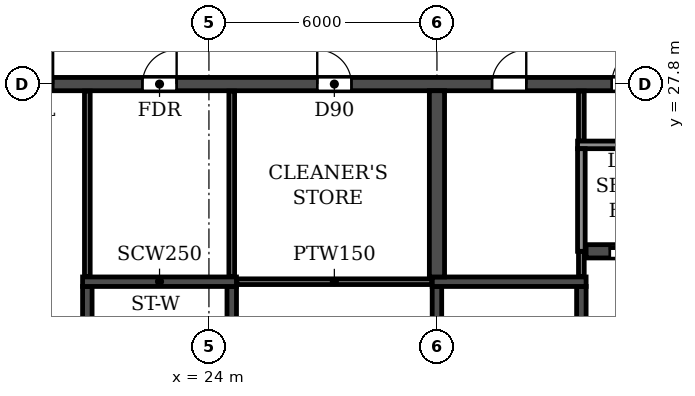
"""IFC4 building model, lengths in metres.
Left out: names, types, materials, properties, quantities, classifications, styles, units other than length and angle.
Written with IfcOpenShell. Run it as: python <this file> out.ifc"""

import sys

from ifc_helpers import new_model, si_unit, direction, frame, frame_2d, origin, place, context, subcontext, project, spatial, rectangle, extrude, element, fill, save


model = new_model("IFC4")
c1 = context("Model", 3, precision=1e-05, world=origin(), true_north=direction((0.0, 1.0)))
c2 = subcontext(c1, "Body", "Model", "MODEL_VIEW")
j1 = project(units=[si_unit("LENGTHUNIT", "METRE"), si_unit("PLANEANGLEUNIT", "RADIAN")], contexts=[c1])
p1 = place(None, origin())
s1 = spatial("IfcSite", under=j1, at=p1, CompositionType="ELEMENT")
p2 = place(p1, origin())
s2 = spatial("IfcBuilding", under=s1, at=p2, CompositionType="ELEMENT")
p3 = place(p2, frame((0.0, 0.0, 261.0)))
s3 = spatial("IfcBuildingStorey", under=s2, at=p3, CompositionType="ELEMENT", Elevation=261.0)
p4 = place(p3, frame((18.2, 27.8, 0.0), z_axis=(0.0, 0.0, 1.0), x_axis=(1.0, 0.0, 0.0)))
e1 = element("IfcWall", 1, at=p4, inside=s3, PredefinedType="SOLIDWALL", context=c2, shape_type="SweptSolid", body=[
    extrude(rectangle(XDim=65.6, YDim=0.35, at=frame_2d((32.8, 0.0))), origin(), (0.0, 0.0, 1.0), 5.7),
])
p5 = place(p4, frame((0.7, 0.0, 0.0)))
e2 = element("IfcOpeningElement", 2, at=p5, cuts=e1, PredefinedType="OPENING", context=c2, shape_type="SweptSolid", body=[
    extrude(rectangle(XDim=1.0, YDim=2.1, at=frame_2d((0.5, 1.05))), frame((0.0, 0.185, 0.0), z_axis=(0.0, -1.0, 0.0), x_axis=(1.0, 0.0, 0.0)), (0.0, 0.0, 1.0), 0.37),
])
p6 = place(p4, frame((4.05, 0.0, 0.0)))
e3 = element("IfcOpeningElement", 3, at=p6, cuts=e1, PredefinedType="OPENING", context=c2, shape_type="SweptSolid", body=[
    extrude(rectangle(XDim=0.9, YDim=2.1, at=frame_2d((0.45, 1.05))), frame((0.0, 0.185, 0.0), z_axis=(0.0, -1.0, 0.0), x_axis=(1.0, 0.0, 0.0)), (0.0, 0.0, 1.0), 0.37),
])
p7 = place(p4, frame((8.65, 0.0, 0.0)))
e4 = element("IfcOpeningElement", 4, at=p7, cuts=e1, PredefinedType="OPENING", context=c2, shape_type="SweptSolid", body=[
    extrude(rectangle(XDim=0.9, YDim=2.1, at=frame_2d((0.45, 1.05))), frame((0.0, 0.185, 0.0), z_axis=(0.0, -1.0, 0.0), x_axis=(1.0, 0.0, 0.0)), (0.0, 0.0, 1.0), 0.37),
])
p8 = place(p4, frame((13.25, 0.0, 0.0)))
e5 = element("IfcOpeningElement", 5, at=p8, cuts=e1, PredefinedType="OPENING", context=c2, shape_type="SweptSolid", body=[
    extrude(rectangle(XDim=0.9, YDim=2.1, at=frame_2d((0.45, 1.05))), frame((0.0, 0.185, 0.0), z_axis=(0.0, -1.0, 0.0), x_axis=(1.0, 0.0, 0.0)), (0.0, 0.0, 1.0), 0.37),
])
p9 = place(p4, frame((16.4, 0.0, 0.0)))
e6 = element("IfcOpeningElement", 6, at=p9, cuts=e1, PredefinedType="OPENING", context=c2, shape_type="SweptSolid", body=[
    extrude(rectangle(XDim=1.0, YDim=2.1, at=frame_2d((0.5, 1.05))), frame((0.0, 0.185, 0.0), z_axis=(0.0, -1.0, 0.0), x_axis=(1.0, 0.0, 0.0)), (0.0, 0.0, 1.0), 0.37),
])
p10 = place(p4, frame((21.6, 0.0, 0.0)))
e7 = element("IfcOpeningElement", 7, at=p10, cuts=e1, PredefinedType="OPENING", context=c2, shape_type="SweptSolid", body=[
    extrude(rectangle(XDim=1.0, YDim=2.1, at=frame_2d((0.5, 1.05))), frame((0.0, 0.185, 0.0), z_axis=(0.0, -1.0, 0.0), x_axis=(1.0, 0.0, 0.0)), (0.0, 0.0, 1.0), 0.37),
])
p11 = place(p4, frame((29.4, 0.0, 0.0)))
e8 = element("IfcOpeningElement", 8, at=p11, cuts=e1, PredefinedType="OPENING", context=c2, shape_type="SweptSolid", body=[
    extrude(rectangle(XDim=1.0, YDim=2.1, at=frame_2d((0.5, 1.05))), frame((0.0, 0.185, 0.0), z_axis=(0.0, -1.0, 0.0), x_axis=(1.0, 0.0, 0.0)), (0.0, 0.0, 1.0), 0.37),
])
p12 = place(p4, frame((32.3, 0.0, 0.0)))
e9 = element("IfcOpeningElement", 9, at=p12, cuts=e1, PredefinedType="OPENING", context=c2, shape_type="SweptSolid", body=[
    extrude(rectangle(XDim=1.0, YDim=2.1, at=frame_2d((0.5, 1.05))), frame((0.0, 0.185, 0.0), z_axis=(0.0, -1.0, 0.0), x_axis=(1.0, 0.0, 0.0)), (0.0, 0.0, 1.0), 0.37),
])
p13 = place(p4, frame((35.2, 0.0, 0.0)))
e10 = element("IfcOpeningElement", 10, at=p13, cuts=e1, PredefinedType="OPENING", context=c2, shape_type="SweptSolid", body=[
    extrude(rectangle(XDim=1.0, YDim=2.1, at=frame_2d((0.5, 1.05))), frame((0.0, 0.185, 0.0), z_axis=(0.0, -1.0, 0.0), x_axis=(1.0, 0.0, 0.0)), (0.0, 0.0, 1.0), 0.37),
])
p14 = place(p4, frame((37.8, 0.0, 0.0)))
e11 = element("IfcOpeningElement", 11, at=p14, cuts=e1, PredefinedType="OPENING", context=c2, shape_type="SweptSolid", body=[
    extrude(rectangle(XDim=1.0, YDim=2.1, at=frame_2d((0.5, 1.05))), frame((0.0, 0.185, 0.0), z_axis=(0.0, -1.0, 0.0), x_axis=(1.0, 0.0, 0.0)), (0.0, 0.0, 1.0), 0.37),
])
p15 = place(p4, frame((41.7, 0.0, 0.0)))
e12 = element("IfcOpeningElement", 12, at=p15, cuts=e1, PredefinedType="OPENING", context=c2, shape_type="SweptSolid", body=[
    extrude(rectangle(XDim=1.0, YDim=2.1, at=frame_2d((0.5, 1.05))), frame((0.0, 0.185, 0.0), z_axis=(0.0, -1.0, 0.0), x_axis=(1.0, 0.0, 0.0)), (0.0, 0.0, 1.0), 0.37),
])
p16 = place(p4, frame((45.6, 0.0, 0.0)))
e13 = element("IfcOpeningElement", 13, at=p16, cuts=e1, PredefinedType="OPENING", context=c2, shape_type="SweptSolid", body=[
    extrude(rectangle(XDim=1.0, YDim=2.1, at=frame_2d((0.5, 1.05))), frame((0.0, 0.185, 0.0), z_axis=(0.0, -1.0, 0.0), x_axis=(1.0, 0.0, 0.0)), (0.0, 0.0, 1.0), 0.37),
])
p17 = place(p4, frame((48.2, 0.0, 0.0)))
e14 = element("IfcOpeningElement", 14, at=p17, cuts=e1, PredefinedType="OPENING", context=c2, shape_type="SweptSolid", body=[
    extrude(rectangle(XDim=1.0, YDim=2.1, at=frame_2d((0.5, 1.05))), frame((0.0, 0.185, 0.0), z_axis=(0.0, -1.0, 0.0), x_axis=(1.0, 0.0, 0.0)), (0.0, 0.0, 1.0), 0.37),
])
p18 = place(p4, frame((51.45, 0.0, 0.0)))
e15 = element("IfcOpeningElement", 15, at=p18, cuts=e1, PredefinedType="OPENING", context=c2, shape_type="SweptSolid", body=[
    extrude(rectangle(XDim=0.9, YDim=2.1, at=frame_2d((0.45, 1.05))), frame((0.0, 0.185, 0.0), z_axis=(0.0, -1.0, 0.0), x_axis=(1.0, 0.0, 0.0)), (0.0, 0.0, 1.0), 0.37),
])
p19 = place(p4, frame((56.05, 0.0, 0.0)))
e16 = element("IfcOpeningElement", 16, at=p19, cuts=e1, PredefinedType="OPENING", context=c2, shape_type="SweptSolid", body=[
    extrude(rectangle(XDim=0.9, YDim=2.1, at=frame_2d((0.45, 1.05))), frame((0.0, 0.185, 0.0), z_axis=(0.0, -1.0, 0.0), x_axis=(1.0, 0.0, 0.0)), (0.0, 0.0, 1.0), 0.37),
])
p20 = place(p4, frame((60.65, 0.0, 0.0)))
e17 = element("IfcOpeningElement", 17, at=p20, cuts=e1, PredefinedType="OPENING", context=c2, shape_type="SweptSolid", body=[
    extrude(rectangle(XDim=0.9, YDim=2.1, at=frame_2d((0.45, 1.05))), frame((0.0, 0.185, 0.0), z_axis=(0.0, -1.0, 0.0), x_axis=(1.0, 0.0, 0.0)), (0.0, 0.0, 1.0), 0.37),
])
p21 = place(p4, frame((63.9, 0.0, 0.0)))
e18 = element("IfcOpeningElement", 18, at=p21, cuts=e1, PredefinedType="OPENING", context=c2, shape_type="SweptSolid", body=[
    extrude(rectangle(XDim=1.0, YDim=2.1, at=frame_2d((0.5, 1.05))), frame((0.0, 0.185, 0.0), z_axis=(0.0, -1.0, 0.0), x_axis=(1.0, 0.0, 0.0)), (0.0, 0.0, 1.0), 0.37),
])
p22 = place(p3, frame((33.925, 23.4, 0.0), z_axis=(0.0, 0.0, 1.0), x_axis=(1.0, 0.0, 0.0)))
e19 = element("IfcWall", 19, at=p22, inside=s3, PredefinedType="SOLIDWALL", context=c2, shape_type="SweptSolid", body=[
    extrude(rectangle(XDim=34.15, YDim=0.35, at=frame_2d((17.075, 0.0))), origin(), (0.0, 0.0, 1.0), 5.7),
])
p23 = place(p22, frame((16.175, 0.0, 0.0)))
e20 = element("IfcOpeningElement", 20, at=p23, cuts=e19, PredefinedType="OPENING", context=c2, shape_type="SweptSolid", body=[
    extrude(rectangle(XDim=1.8, YDim=2.1, at=frame_2d((0.9, 1.05))), frame((0.0, 0.185, 0.0), z_axis=(0.0, -1.0, 0.0), x_axis=(1.0, 0.0, 0.0)), (0.0, 0.0, 1.0), 0.37),
])
p24 = place(p22, frame((0.625, 0.0, 0.0)))
e21 = element("IfcOpeningElement", 21, at=p24, cuts=e19, PredefinedType="OPENING", context=c2, shape_type="SweptSolid", body=[
    extrude(rectangle(XDim=1.1, YDim=2.1, at=frame_2d((0.55, 1.05))), frame((0.0, 0.185, 0.0), z_axis=(0.0, -1.0, 0.0), x_axis=(1.0, 0.0, 0.0)), (0.0, 0.0, 1.0), 0.37),
])
p25 = place(p22, frame((3.225, 0.0, 0.0)))
e22 = element("IfcOpeningElement", 22, at=p25, cuts=e19, PredefinedType="OPENING", context=c2, shape_type="SweptSolid", body=[
    extrude(rectangle(XDim=1.1, YDim=2.1, at=frame_2d((0.55, 1.05))), frame((0.0, 0.185, 0.0), z_axis=(0.0, -1.0, 0.0), x_axis=(1.0, 0.0, 0.0)), (0.0, 0.0, 1.0), 0.37),
])
p26 = place(p22, frame((5.825, 0.0, 0.0)))
e23 = element("IfcOpeningElement", 23, at=p26, cuts=e19, PredefinedType="OPENING", context=c2, shape_type="SweptSolid", body=[
    extrude(rectangle(XDim=1.1, YDim=2.1, at=frame_2d((0.55, 1.05))), frame((0.0, 0.185, 0.0), z_axis=(0.0, -1.0, 0.0), x_axis=(1.0, 0.0, 0.0)), (0.0, 0.0, 1.0), 0.37),
])
p27 = place(p22, frame((8.425, 0.0, 0.0)))
e24 = element("IfcOpeningElement", 24, at=p27, cuts=e19, PredefinedType="OPENING", context=c2, shape_type="SweptSolid", body=[
    extrude(rectangle(XDim=1.1, YDim=2.1, at=frame_2d((0.55, 1.05))), frame((0.0, 0.185, 0.0), z_axis=(0.0, -1.0, 0.0), x_axis=(1.0, 0.0, 0.0)), (0.0, 0.0, 1.0), 0.37),
])
p28 = place(p22, frame((11.025, 0.0, 0.0)))
e25 = element("IfcOpeningElement", 25, at=p28, cuts=e19, PredefinedType="OPENING", context=c2, shape_type="SweptSolid", body=[
    extrude(rectangle(XDim=1.1, YDim=2.1, at=frame_2d((0.55, 1.05))), frame((0.0, 0.185, 0.0), z_axis=(0.0, -1.0, 0.0), x_axis=(1.0, 0.0, 0.0)), (0.0, 0.0, 1.0), 0.37),
])
p29 = place(p22, frame((13.625, 0.0, 0.0)))
e26 = element("IfcOpeningElement", 26, at=p29, cuts=e19, PredefinedType="OPENING", context=c2, shape_type="SweptSolid", body=[
    extrude(rectangle(XDim=1.1, YDim=2.1, at=frame_2d((0.55, 1.05))), frame((0.0, 0.185, 0.0), z_axis=(0.0, -1.0, 0.0), x_axis=(1.0, 0.0, 0.0)), (0.0, 0.0, 1.0), 0.37),
])
p30 = place(p22, frame((24.625, 0.0, 0.0)))
e27 = element("IfcOpeningElement", 27, at=p30, cuts=e19, PredefinedType="OPENING", context=c2, shape_type="SweptSolid", body=[
    extrude(rectangle(XDim=1.1, YDim=2.1, at=frame_2d((0.55, 1.05))), frame((0.0, 0.185, 0.0), z_axis=(0.0, -1.0, 0.0), x_axis=(1.0, 0.0, 0.0)), (0.0, 0.0, 1.0), 0.37),
])
p31 = place(p22, frame((27.225, 0.0, 0.0)))
e28 = element("IfcOpeningElement", 28, at=p31, cuts=e19, PredefinedType="OPENING", context=c2, shape_type="SweptSolid", body=[
    extrude(rectangle(XDim=1.1, YDim=2.1, at=frame_2d((0.55, 1.05))), frame((0.0, 0.185, 0.0), z_axis=(0.0, -1.0, 0.0), x_axis=(1.0, 0.0, 0.0)), (0.0, 0.0, 1.0), 0.37),
])
p32 = place(p3, frame((30.0, 22.725, 0.0), z_axis=(0.0, 0.0, 1.0), x_axis=(0.0, 1.0, 0.0)))
e29 = element("IfcWall", 29, at=p32, inside=s3, PredefinedType="SOLIDWALL", context=c2, shape_type="SweptSolid", body=[
    extrude(rectangle(XDim=4.9, YDim=0.4, at=frame_2d((2.45, 0.0))), origin(), (0.0, 0.0, 1.0), 5.7),
])
p33 = place(p3, frame((30.0, 14.775, 0.0), z_axis=(0.0, 0.0, 1.0), x_axis=(0.0, 1.0, 0.0)))
e30 = element("IfcWall", 30, at=p33, inside=s3, PredefinedType="SOLIDWALL", context=c2, shape_type="SweptSolid", body=[
    extrude(rectangle(XDim=7.7, YDim=0.25, at=frame_2d((3.85, 0.0))), origin(), (0.0, 0.0, 1.0), 5.7),
])
p34 = place(p3, frame((33.8, 14.775, 0.0), z_axis=(0.0, 0.0, 1.0), x_axis=(0.0, 1.0, 0.0)))
e31 = element("IfcWall", 31, at=p34, inside=s3, PredefinedType="SOLIDWALL", context=c2, shape_type="SweptSolid", body=[
    extrude(rectangle(XDim=7.7, YDim=0.25, at=frame_2d((3.85, 0.0))), origin(), (0.0, 0.0, 1.0), 5.7),
])
p35 = place(p34, frame((0.525, 0.0, 0.0)))
e32 = element("IfcOpeningElement", 32, at=p35, cuts=e31, PredefinedType="OPENING", context=c2, shape_type="SweptSolid", body=[
    extrude(rectangle(XDim=1.0, YDim=2.1, at=frame_2d((0.5, 1.05))), frame((0.0, 0.135, 0.0), z_axis=(0.0, -1.0, 0.0), x_axis=(1.0, 0.0, 0.0)), (0.0, 0.0, 1.0), 0.27),
])
p36 = place(p3, frame((29.875, 22.6, 0.0), z_axis=(0.0, 0.0, 1.0), x_axis=(1.0, 0.0, 0.0)))
e33 = element("IfcWall", 33, at=p36, inside=s3, PredefinedType="SOLIDWALL", context=c2, shape_type="SweptSolid", body=[
    extrude(rectangle(XDim=4.05, YDim=0.25, at=frame_2d((2.025, 0.0))), origin(), (0.0, 0.0, 1.0), 5.7),
])
p37 = place(p3, frame((20.8, 14.775, 0.0), z_axis=(0.0, 0.0, 1.0), x_axis=(0.0, 1.0, 0.0)))
e34 = element("IfcWall", 34, at=p37, inside=s3, PredefinedType="SOLIDWALL", context=c2, shape_type="SweptSolid", body=[
    extrude(rectangle(XDim=7.7, YDim=0.25, at=frame_2d((3.85, 0.0))), origin(), (0.0, 0.0, 1.0), 5.7),
])
p38 = place(p37, frame((0.525, 0.0, 0.0)))
e35 = element("IfcOpeningElement", 35, at=p38, cuts=e34, PredefinedType="OPENING", context=c2, shape_type="SweptSolid", body=[
    extrude(rectangle(XDim=1.0, YDim=2.1, at=frame_2d((0.5, 1.05))), frame((0.0, 0.135, 0.0), z_axis=(0.0, -1.0, 0.0), x_axis=(1.0, 0.0, 0.0)), (0.0, 0.0, 1.0), 0.27),
])
p39 = place(p3, frame((24.6, 14.775, 0.0), z_axis=(0.0, 0.0, 1.0), x_axis=(0.0, 1.0, 0.0)))
e36 = element("IfcWall", 36, at=p39, inside=s3, PredefinedType="SOLIDWALL", context=c2, shape_type="SweptSolid", body=[
    extrude(rectangle(XDim=7.7, YDim=0.25, at=frame_2d((3.85, 0.0))), origin(), (0.0, 0.0, 1.0), 5.7),
])
p40 = place(p3, frame((20.675, 22.6, 0.0), z_axis=(0.0, 0.0, 1.0), x_axis=(1.0, 0.0, 0.0)))
e37 = element("IfcWall", 37, at=p40, inside=s3, PredefinedType="SOLIDWALL", context=c2, shape_type="SweptSolid", body=[
    extrude(rectangle(XDim=4.05, YDim=0.25, at=frame_2d((2.025, 0.0))), origin(), (0.0, 0.0, 1.0), 5.7),
])
p41 = place(p3, frame((24.735, 22.6, 0.0), z_axis=(0.0, 0.0, 1.0), x_axis=(1.0, 0.0, 0.0)))
e38 = element("IfcWall", 38, at=p41, inside=s3, PredefinedType="PARTITIONING", context=c2, shape_type="SweptSolid", body=[
    extrude(rectangle(XDim=5.13, YDim=0.15, at=frame_2d((2.565, 0.0))), origin(), (0.0, 0.0, 1.0), 5.7),
])
for number, where, z_axis, x_axis in (
    (39, (20.8, 22.735, 0.0), (0.0, 0.0, 1.0), (0.0, 1.0, 0.0)),
    (40, (24.6, 22.735, 0.0), (0.0, 0.0, 1.0), (0.0, 1.0, 0.0)),
):
    element("IfcWall", number, at=place(p3, frame(where, z_axis=z_axis, x_axis=x_axis)), inside=s3, PredefinedType="PARTITIONING", context=c2, shape_type="SweptSolid", body=[
        extrude(rectangle(XDim=4.88, YDim=0.15, at=frame_2d((2.44, 0.0))), origin(), (0.0, 0.0, 1.0), 5.7),
    ])
p42 = place(p3, frame((33.8, 22.735, 0.0), z_axis=(0.0, 0.0, 1.0), x_axis=(0.0, 1.0, 0.0)))
e41 = element("IfcWall", 41, at=p42, inside=s3, PredefinedType="PARTITIONING", context=c2, shape_type="SweptSolid", body=[
    extrude(rectangle(XDim=0.665, YDim=0.15, at=frame_2d((0.333, 0.0))), origin(), (0.0, 0.0, 1.0), 5.7),
])
p43 = place(p3, frame((33.8, 26.3, 0.0), z_axis=(0.0, 0.0, 1.0), x_axis=(0.0, 1.0, 0.0)))
e42 = element("IfcWall", 42, at=p43, inside=s3, PredefinedType="PARTITIONING", context=c2, shape_type="SweptSolid", body=[
    extrude(rectangle(XDim=1.315, YDim=0.15, at=frame_2d((0.657, 0.0))), origin(), (0.0, 0.0, 1.0), 5.7),
])
p44 = place(p3, frame((33.7, 26.2, 0.0), z_axis=(0.0, 0.0, 1.0), x_axis=(1.0, 0.0, 0.0)))
e43 = element("IfcWall", 43, at=p44, inside=s3, PredefinedType="PARTITIONING", context=c2, shape_type="SweptSolid", body=[
    extrude(rectangle(XDim=10.4, YDim=0.2, at=frame_2d((5.2, 0.0))), origin(), (0.0, 0.0, 1.0), 5.7),
])
p45 = place(p3, frame((33.8, 23.4, 0.0), z_axis=(0.0, 0.0, 1.0), x_axis=(0.0, 1.0, 0.0)))
e44 = element("IfcWall", 44, at=p45, inside=s3, PredefinedType="PARTITIONING", context=c2, shape_type="SweptSolid", body=[
    extrude(rectangle(XDim=2.7, YDim=0.2, at=frame_2d((1.35, 0.0))), origin(), (0.0, 0.0, 1.0), 5.7),
])
p46 = place(p5, origin())
e45 = element("IfcDoor", 45, at=p46, inside=s3, OperationType="SINGLE_SWING_RIGHT", PredefinedType="DOOR", context=c2, shape_type="SweptSolid", body=[
    extrude(rectangle(XDim=1.0, YDim=2.1, at=frame_2d((0.5, 1.05))), frame((0.0, 0.025, 0.0), z_axis=(0.0, -1.0, 0.0), x_axis=(1.0, 0.0, 0.0)), (0.0, 0.0, 1.0), 0.05),
])
fill(e2, e45)
p47 = place(p6, origin())
e46 = element("IfcDoor", 46, at=p47, inside=s3, OperationType="SINGLE_SWING_RIGHT", PredefinedType="DOOR", context=c2, shape_type="SweptSolid", body=[
    extrude(rectangle(XDim=0.9, YDim=2.1, at=frame_2d((0.45, 1.05))), frame((0.0, 0.025, 0.0), z_axis=(0.0, -1.0, 0.0), x_axis=(1.0, 0.0, 0.0)), (0.0, 0.0, 1.0), 0.05),
])
fill(e3, e46)
p48 = place(p7, origin())
e47 = element("IfcDoor", 47, at=p48, inside=s3, OperationType="SINGLE_SWING_LEFT", PredefinedType="DOOR", context=c2, shape_type="SweptSolid", body=[
    extrude(rectangle(XDim=0.9, YDim=2.1, at=frame_2d((0.45, 1.05))), frame((0.0, 0.025, 0.0), z_axis=(0.0, -1.0, 0.0), x_axis=(1.0, 0.0, 0.0)), (0.0, 0.0, 1.0), 0.05),
])
fill(e4, e47)
p49 = place(p8, origin())
e48 = element("IfcDoor", 48, at=p49, inside=s3, OperationType="SINGLE_SWING_RIGHT", PredefinedType="DOOR", context=c2, shape_type="SweptSolid", body=[
    extrude(rectangle(XDim=0.9, YDim=2.1, at=frame_2d((0.45, 1.05))), frame((0.0, 0.025, 0.0), z_axis=(0.0, -1.0, 0.0), x_axis=(1.0, 0.0, 0.0)), (0.0, 0.0, 1.0), 0.05),
])
fill(e5, e48)
p50 = place(p9, origin())
e49 = element("IfcDoor", 49, at=p50, inside=s3, OperationType="SINGLE_SWING_RIGHT", PredefinedType="DOOR", context=c2, shape_type="SweptSolid", body=[
    extrude(rectangle(XDim=1.0, YDim=2.1, at=frame_2d((0.5, 1.05))), frame((0.0, 0.025, 0.0), z_axis=(0.0, -1.0, 0.0), x_axis=(1.0, 0.0, 0.0)), (0.0, 0.0, 1.0), 0.05),
])
fill(e6, e49)
p51 = place(p24, origin())
e50 = element("IfcDoor", 50, at=p51, inside=s3, OperationType="DOUBLE_DOOR_SLIDING", PredefinedType="DOOR", context=c2, shape_type="SweptSolid", body=[
    extrude(rectangle(XDim=1.1, YDim=2.1, at=frame_2d((0.55, 1.05))), frame((0.0, 0.025, 0.0), z_axis=(0.0, -1.0, 0.0), x_axis=(1.0, 0.0, 0.0)), (0.0, 0.0, 1.0), 0.05),
])
fill(e21, e50)
save(model, sys.argv[1])
